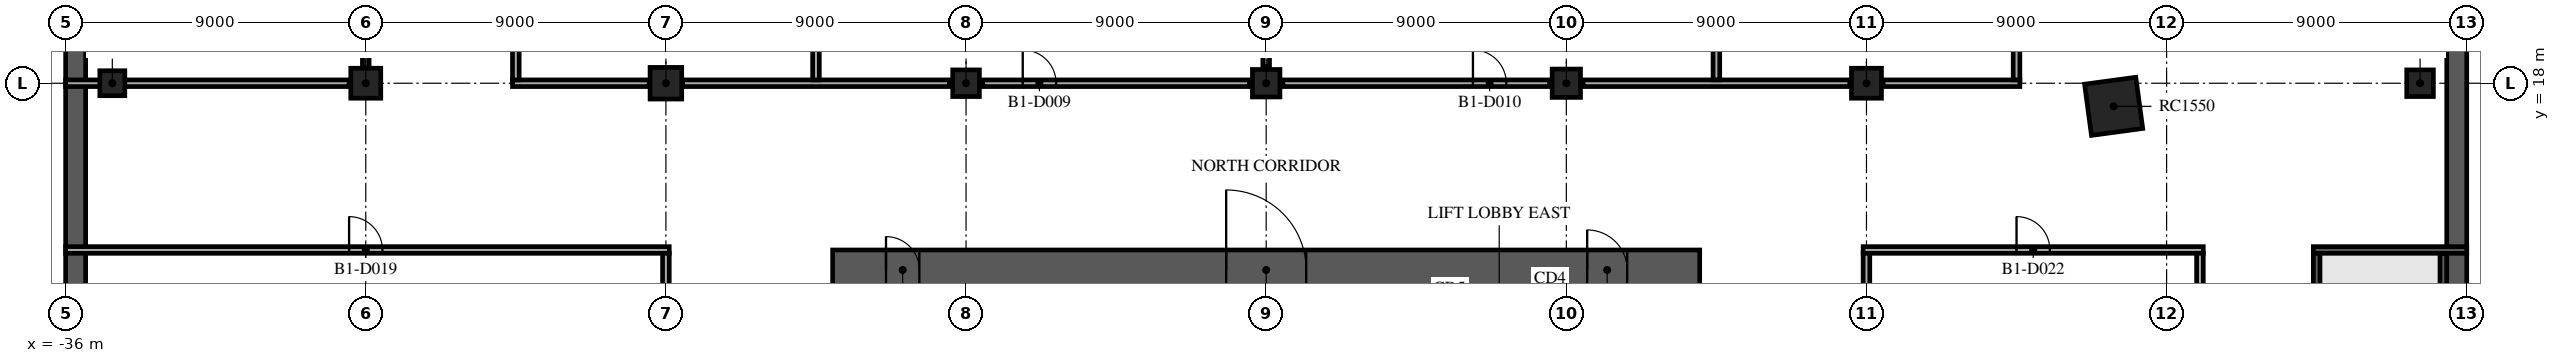
"""IFC4 building model, lengths in metres.
Left out: names, types, materials, properties, quantities, classifications, styles, units other than length and angle.
Written with IfcOpenShell. Run it as: python <this file> out.ifc"""

import sys

from ifc_helpers import new_model, si_unit, direction, frame, frame_2d, origin, origin_2d, place, context, subcontext, project, spatial, rectangle, extrude, element, fill, save


model = new_model("IFC4")
c1 = context("Model", 3, precision=1e-05, world=origin(), true_north=direction((0.0, 1.0)))
c2 = subcontext(c1, "Body", "Model", "MODEL_VIEW")
j1 = project(units=[si_unit("LENGTHUNIT", "METRE"), si_unit("PLANEANGLEUNIT", "RADIAN")], contexts=[c1])
p1 = place(None, origin())
s1 = spatial("IfcSite", under=j1, at=p1, CompositionType="ELEMENT")
p2 = place(p1, origin())
s2 = spatial("IfcBuilding", under=s1, at=p2, CompositionType="ELEMENT")
p3 = place(p2, frame((0.0, 0.0, -4.5)))
s3 = spatial("IfcBuildingStorey", under=s2, at=p3, CompositionType="ELEMENT", Elevation=-4.5)
for number, where, z_axis, x_axis in (
    (1, (35.7, -31.0, -0.3), (0.0, 0.0, 1.0), (0.0, 1.0, 0.0)),
    (2, (-35.7, 31.0, -0.3), (0.0, 0.0, 1.0), (0.0, -1.0, 0.0)),
):
    element("IfcWall", number, at=place(p3, frame(where, z_axis=z_axis, x_axis=x_axis)), inside=s3, PredefinedType="SOLIDWALL", context=c2, shape_type="SweptSolid", body=[
        extrude(rectangle(XDim=62.0, YDim=0.6, at=frame_2d((31.0, 0.0))), origin(), (0.0, 0.0, 1.0), 4.4),
    ])
p4 = place(p3, frame((-34.6, 18.0, 0.0), z_axis=(0.0, 0.0, 1.0), x_axis=(1.0, 0.0, 0.0)))
e3 = element("IfcColumn", 3, at=p4, inside=s3, PredefinedType="COLUMN", context=c2, shape_type="SweptSolid", body=[
    extrude(rectangle(XDim=0.75, YDim=0.75, at=origin_2d()), origin(), (0.0, 0.0, 1.0), 4.5),
])
p5 = place(p3, frame((-27.0, 18.0, 0.0), z_axis=(0.0, 0.0, 1.0), x_axis=(1.0, 0.0, 0.0)))
e4 = element("IfcColumn", 4, at=p5, inside=s3, PredefinedType="COLUMN", context=c2, shape_type="SweptSolid", body=[
    extrude(rectangle(XDim=0.9, YDim=0.9, at=origin_2d()), origin(), (0.0, 0.0, 1.0), 4.5),
])
p6 = place(p3, frame((-18.0, 18.0, 0.0), z_axis=(0.0, 0.0, 1.0), x_axis=(1.0, 0.0, 0.0)))
e5 = element("IfcColumn", 5, at=p6, inside=s3, PredefinedType="COLUMN", context=c2, shape_type="SweptSolid", body=[
    extrude(rectangle(XDim=0.95, YDim=0.95, at=origin_2d()), origin(), (0.0, 0.0, 1.0), 4.5),
])
p7 = place(p3, frame((-9.0, 18.0, 0.0), z_axis=(0.0, 0.0, 1.0), x_axis=(1.0, 0.0, 0.0)))
e6 = element("IfcColumn", 6, at=p7, inside=s3, PredefinedType="COLUMN", context=c2, shape_type="SweptSolid", body=[
    extrude(rectangle(XDim=0.8, YDim=0.8, at=origin_2d()), origin(), (0.0, 0.0, 1.0), 4.5),
])
p8 = place(p3, frame((0.0, 18.0, 0.0), z_axis=(0.0, 0.0, 1.0), x_axis=(1.0, 0.0, 0.0)))
e7 = element("IfcColumn", 7, at=p8, inside=s3, PredefinedType="COLUMN", context=c2, shape_type="SweptSolid", body=[
    extrude(rectangle(XDim=0.825, YDim=0.825, at=origin_2d()), origin(), (0.0, 0.0, 1.0), 4.5),
])
p9 = place(p3, frame((9.0, 18.0, 0.0), z_axis=(0.0, 0.0, 1.0), x_axis=(1.0, 0.0, 0.0)))
e8 = element("IfcColumn", 8, at=p9, inside=s3, PredefinedType="COLUMN", context=c2, shape_type="SweptSolid", body=[
    extrude(rectangle(XDim=0.85, YDim=0.85, at=origin_2d()), origin(), (0.0, 0.0, 1.0), 4.5),
])
p10 = place(p3, frame((18.0, 18.0, 0.0), z_axis=(0.0, 0.0, 1.0), x_axis=(1.0, 0.0, 0.0)))
e9 = element("IfcColumn", 9, at=p10, inside=s3, PredefinedType="COLUMN", context=c2, shape_type="SweptSolid", body=[
    extrude(rectangle(XDim=0.9, YDim=0.9, at=origin_2d()), origin(), (0.0, 0.0, 1.0), 4.5),
])
p11 = place(p3, frame((34.6, 18.0, 0.0), z_axis=(0.0, 0.0, 1.0), x_axis=(1.0, 0.0, 0.0)))
e10 = element("IfcColumn", 10, at=p11, inside=s3, PredefinedType="COLUMN", context=c2, shape_type="SweptSolid", body=[
    extrude(rectangle(XDim=0.8, YDim=0.8, at=origin_2d()), origin(), (0.0, 0.0, 1.0), 4.5),
])
p12 = place(p3, frame((25.412, 17.307, 0.0), z_axis=(0.0, 0.0, 1.0), x_axis=(0.991001197216, 0.133853005627, 0.0)))
e11 = element("IfcColumn", 11, at=p12, inside=s3, PredefinedType="COLUMN", context=c2, shape_type="SweptSolid", body=[
    extrude(rectangle(XDim=1.55, YDim=1.55, at=origin_2d()), origin(), (0.0, 0.0, 1.0), 4.5),
])
p13 = place(p3, frame((-13.0, 12.4, 0.0), z_axis=(0.0, 0.0, 1.0), x_axis=(1.0, 0.0, 0.0)))
e12 = element("IfcWall", 12, at=p13, inside=s3, PredefinedType="SHEAR", context=c2, shape_type="SweptSolid", body=[
    extrude(rectangle(XDim=26.0, YDim=1.2, at=frame_2d((13.0, 0.0))), origin(), (0.0, 0.0, 1.0), 4.1),
])
p14 = place(p13, frame((11.8, 0.0, 0.0)))
e13 = element("IfcOpeningElement", 13, at=p14, cuts=e12, PredefinedType="OPENING", context=c2, shape_type="SweptSolid", body=[
    extrude(rectangle(XDim=2.4, YDim=2.4, at=frame_2d((1.2, 1.2))), frame((0.0, 0.61, 0.0), z_axis=(0.0, -1.0, 0.0), x_axis=(1.0, 0.0, 0.0)), (0.0, 0.0, 1.0), 1.22),
])
p15 = place(p13, frame((22.625, 0.0, 0.0)))
e14 = element("IfcOpeningElement", 14, at=p15, cuts=e12, PredefinedType="OPENING", context=c2, shape_type="SweptSolid", body=[
    extrude(rectangle(XDim=1.2, YDim=2.1, at=frame_2d((0.6, 1.05))), frame((0.0, 0.61, 0.0), z_axis=(0.0, -1.0, 0.0), x_axis=(1.0, 0.0, 0.0)), (0.0, 0.0, 1.0), 1.22),
])
p16 = place(p13, frame((1.6, 0.0, 0.0)))
e15 = element("IfcOpeningElement", 15, at=p16, cuts=e12, PredefinedType="OPENING", context=c2, shape_type="SweptSolid", body=[
    extrude(rectangle(XDim=1.0, YDim=2.1, at=frame_2d((0.5, 1.05))), frame((0.0, 0.61, 0.0), z_axis=(0.0, -1.0, 0.0), x_axis=(1.0, 0.0, 0.0)), (0.0, 0.0, 1.0), 1.22),
])
p17 = place(p3, frame((-36.0, 13.0, 0.0), z_axis=(0.0, 0.0, 1.0), x_axis=(1.0, 0.0, 0.0)))
e16 = element("IfcWall", 16, at=p17, inside=s3, PredefinedType="PARTITIONING", context=c2, shape_type="SweptSolid", body=[
    extrude(rectangle(XDim=18.1, YDim=0.2, at=frame_2d((9.05, 0.0))), origin(), (0.0, 0.0, 1.0), 4.1),
])
p18 = place(p17, frame((8.5, 0.0, 0.0)))
e17 = element("IfcOpeningElement", 17, at=p18, cuts=e16, PredefinedType="OPENING", context=c2, shape_type="SweptSolid", body=[
    extrude(rectangle(XDim=1.0, YDim=2.1, at=frame_2d((0.5, 1.05))), frame((0.0, 0.11, 0.0), z_axis=(0.0, -1.0, 0.0), x_axis=(1.0, 0.0, 0.0)), (0.0, 0.0, 1.0), 0.22),
])
p19 = place(p3, frame((17.9, 13.0, 0.0), z_axis=(0.0, 0.0, 1.0), x_axis=(1.0, 0.0, 0.0)))
e18 = element("IfcWall", 18, at=p19, inside=s3, PredefinedType="PARTITIONING", context=c2, shape_type="SweptSolid", body=[
    extrude(rectangle(XDim=10.2, YDim=0.2, at=frame_2d((5.1, 0.0))), origin(), (0.0, 0.0, 1.0), 4.1),
])
p20 = place(p19, frame((4.6, 0.0, 0.0)))
e19 = element("IfcOpeningElement", 19, at=p20, cuts=e18, PredefinedType="OPENING", context=c2, shape_type="SweptSolid", body=[
    extrude(rectangle(XDim=1.0, YDim=2.1, at=frame_2d((0.5, 1.05))), frame((0.0, 0.11, 0.0), z_axis=(0.0, -1.0, 0.0), x_axis=(1.0, 0.0, 0.0)), (0.0, 0.0, 1.0), 0.22),
])
p21 = place(p3, frame((31.4, 13.0, 0.0), z_axis=(0.0, 0.0, 1.0), x_axis=(1.0, 0.0, 0.0)))
e20 = element("IfcWall", 20, at=p21, inside=s3, PredefinedType="PARTITIONING", context=c2, shape_type="SweptSolid", body=[
    extrude(rectangle(XDim=4.6, YDim=0.2, at=frame_2d((2.3, 0.0))), origin(), (0.0, 0.0, 1.0), 4.1),
])
p22 = place(p3, frame((-36.0, 18.0, 0.0), z_axis=(0.0, 0.0, 1.0), x_axis=(1.0, 0.0, 0.0)))
e21 = element("IfcWall", 21, at=p22, inside=s3, PredefinedType="PARTITIONING", context=c2, shape_type="SweptSolid", body=[
    extrude(rectangle(XDim=8.5, YDim=0.2, at=frame_2d((4.25, 0.0))), origin(), (0.0, 0.0, 1.0), 4.1),
])
p23 = place(p3, frame((-22.6, 18.0, 0.0), z_axis=(0.0, 0.0, 1.0), x_axis=(1.0, 0.0, 0.0)))
e22 = element("IfcWall", 22, at=p23, inside=s3, PredefinedType="PARTITIONING", context=c2, shape_type="SweptSolid", body=[
    extrude(rectangle(XDim=4.1, YDim=0.2, at=frame_2d((2.05, 0.0))), origin(), (0.0, 0.0, 1.0), 4.1),
])
p24 = place(p3, frame((-17.5, 18.0, 0.0), z_axis=(0.0, 0.0, 1.0), x_axis=(1.0, 0.0, 0.0)))
e23 = element("IfcWall", 23, at=p24, inside=s3, PredefinedType="PARTITIONING", context=c2, shape_type="SweptSolid", body=[
    extrude(rectangle(XDim=8.0, YDim=0.2, at=frame_2d((4.0, 0.0))), origin(), (0.0, 0.0, 1.0), 4.1),
])
p25 = place(p3, frame((-8.5, 18.0, 0.0), z_axis=(0.0, 0.0, 1.0), x_axis=(1.0, 0.0, 0.0)))
e24 = element("IfcWall", 24, at=p25, inside=s3, PredefinedType="PARTITIONING", context=c2, shape_type="SweptSolid", body=[
    extrude(rectangle(XDim=8.0, YDim=0.2, at=frame_2d((4.0, 0.0))), origin(), (0.0, 0.0, 1.0), 4.1),
])
p26 = place(p25, frame((1.2, 0.0, 0.0)))
e25 = element("IfcOpeningElement", 25, at=p26, cuts=e24, PredefinedType="OPENING", context=c2, shape_type="SweptSolid", body=[
    extrude(rectangle(XDim=1.0, YDim=2.1, at=frame_2d((0.5, 1.05))), frame((0.0, 0.11, 0.0), z_axis=(0.0, -1.0, 0.0), x_axis=(1.0, 0.0, 0.0)), (0.0, 0.0, 1.0), 0.22),
])
p27 = place(p3, frame((0.5, 18.0, 0.0), z_axis=(0.0, 0.0, 1.0), x_axis=(1.0, 0.0, 0.0)))
e26 = element("IfcWall", 26, at=p27, inside=s3, PredefinedType="PARTITIONING", context=c2, shape_type="SweptSolid", body=[
    extrude(rectangle(XDim=8.0, YDim=0.2, at=frame_2d((4.0, 0.0))), origin(), (0.0, 0.0, 1.0), 4.1),
])
p28 = place(p27, frame((5.7, 0.0, 0.0)))
e27 = element("IfcOpeningElement", 27, at=p28, cuts=e26, PredefinedType="OPENING", context=c2, shape_type="SweptSolid", body=[
    extrude(rectangle(XDim=1.0, YDim=2.1, at=frame_2d((0.5, 1.05))), frame((0.0, 0.11, 0.0), z_axis=(0.0, -1.0, 0.0), x_axis=(1.0, 0.0, 0.0)), (0.0, 0.0, 1.0), 0.22),
])
p29 = place(p3, frame((9.5, 18.0, 0.0), z_axis=(0.0, 0.0, 1.0), x_axis=(1.0, 0.0, 0.0)))
e28 = element("IfcWall", 28, at=p29, inside=s3, PredefinedType="PARTITIONING", context=c2, shape_type="SweptSolid", body=[
    extrude(rectangle(XDim=8.0, YDim=0.2, at=frame_2d((4.0, 0.0))), origin(), (0.0, 0.0, 1.0), 4.1),
])
p30 = place(p3, frame((18.5, 18.0, 0.0), z_axis=(0.0, 0.0, 1.0), x_axis=(1.0, 0.0, 0.0)))
e29 = element("IfcWall", 29, at=p30, inside=s3, PredefinedType="PARTITIONING", context=c2, shape_type="SweptSolid", body=[
    extrude(rectangle(XDim=4.1, YDim=0.2, at=frame_2d((2.05, 0.0))), origin(), (0.0, 0.0, 1.0), 4.1),
])
p31 = place(p3, frame((-27.0, 18.45, 0.0), z_axis=(0.0, 0.0, 1.0), x_axis=(0.0, 1.0, 0.0)))
e30 = element("IfcWall", 30, at=p31, inside=s3, PredefinedType="PARTITIONING", context=c2, shape_type="SweptSolid", body=[
    extrude(rectangle(XDim=1.354, YDim=0.2, at=frame_2d((0.677, 0.0))), origin(), (0.0, 0.0, 1.0), 4.1),
])
p32 = place(p3, frame((-22.5, 18.1, 0.0), z_axis=(0.0, 0.0, 1.0), x_axis=(0.0, 1.0, 0.0)))
e31 = element("IfcWall", 31, at=p32, inside=s3, PredefinedType="PARTITIONING", context=c2, shape_type="SweptSolid", body=[
    extrude(rectangle(XDim=13.3, YDim=0.2, at=frame_2d((6.65, 0.0))), origin(), (0.0, 0.0, 1.0), 4.1),
])
p33 = place(p32, frame((6.1, 0.0, 0.0)))
e32 = element("IfcOpeningElement", 32, at=p33, cuts=e31, PredefinedType="OPENING", context=c2, shape_type="SweptSolid", body=[
    extrude(rectangle(XDim=1.0, YDim=2.1, at=frame_2d((0.5, 1.05))), frame((0.0, 0.11, 0.0), z_axis=(0.0, -1.0, 0.0), x_axis=(1.0, 0.0, 0.0)), (0.0, 0.0, 1.0), 0.22),
])
p34 = place(p3, frame((-18.0, 9.5, 0.0), z_axis=(0.0, 0.0, 1.0), x_axis=(0.0, 1.0, 0.0)))
e33 = element("IfcWall", 33, at=p34, inside=s3, PredefinedType="PARTITIONING", context=c2, shape_type="SweptSolid", body=[
    extrude(rectangle(XDim=3.4, YDim=0.2, at=frame_2d((1.7, 0.0))), origin(), (0.0, 0.0, 1.0), 4.1),
])
p35 = place(p3, frame((-13.5, 18.1, 0.0), z_axis=(0.0, 0.0, 1.0), x_axis=(0.0, 1.0, 0.0)))
e34 = element("IfcWall", 34, at=p35, inside=s3, PredefinedType="PARTITIONING", context=c2, shape_type="SweptSolid", body=[
    extrude(rectangle(XDim=17.9, YDim=0.2, at=frame_2d((8.95, 0.0))), origin(), (0.0, 0.0, 1.0), 4.1),
])
p36 = place(p3, frame((0.0, 18.5, 0.0), z_axis=(0.0, 0.0, 1.0), x_axis=(0.0, 1.0, 0.0)))
e35 = element("IfcWall", 35, at=p36, inside=s3, PredefinedType="PARTITIONING", context=c2, shape_type="SweptSolid", body=[
    extrude(rectangle(XDim=8.0, YDim=0.2, at=frame_2d((4.0, 0.0))), origin(), (0.0, 0.0, 1.0), 4.1),
])
p37 = place(p3, frame((13.5, 18.1, 0.0), z_axis=(0.0, 0.0, 1.0), x_axis=(0.0, 1.0, 0.0)))
e36 = element("IfcWall", 36, at=p37, inside=s3, PredefinedType="PARTITIONING", context=c2, shape_type="SweptSolid", body=[
    extrude(rectangle(XDim=17.9, YDim=0.2, at=frame_2d((8.95, 0.0))), origin(), (0.0, 0.0, 1.0), 4.1),
])
p38 = place(p3, frame((18.0, 9.5, 0.0), z_axis=(0.0, 0.0, 1.0), x_axis=(0.0, 1.0, 0.0)))
e37 = element("IfcWall", 37, at=p38, inside=s3, PredefinedType="PARTITIONING", context=c2, shape_type="SweptSolid", body=[
    extrude(rectangle(XDim=3.4, YDim=0.2, at=frame_2d((1.7, 0.0))), origin(), (0.0, 0.0, 1.0), 4.1),
])
p39 = place(p3, frame((22.5, 18.1, 0.0), z_axis=(0.0, 0.0, 1.0), x_axis=(0.0, 1.0, 0.0)))
e38 = element("IfcWall", 38, at=p39, inside=s3, PredefinedType="PARTITIONING", context=c2, shape_type="SweptSolid", body=[
    extrude(rectangle(XDim=13.3, YDim=0.2, at=frame_2d((6.65, 0.0))), origin(), (0.0, 0.0, 1.0), 4.1),
])
p40 = place(p39, frame((6.1, 0.0, 0.0)))
e39 = element("IfcOpeningElement", 39, at=p40, cuts=e38, PredefinedType="OPENING", context=c2, shape_type="SweptSolid", body=[
    extrude(rectangle(XDim=1.0, YDim=2.1, at=frame_2d((0.5, 1.05))), frame((0.0, 0.11, 0.0), z_axis=(0.0, -1.0, 0.0), x_axis=(1.0, 0.0, 0.0)), (0.0, 0.0, 1.0), 0.22),
])
p41 = place(p3, frame((28.0, 4.1, 0.0), z_axis=(0.0, 0.0, 1.0), x_axis=(0.0, 1.0, 0.0)))
e40 = element("IfcWall", 40, at=p41, inside=s3, PredefinedType="PARTITIONING", context=c2, shape_type="SweptSolid", body=[
    extrude(rectangle(XDim=8.8, YDim=0.2, at=frame_2d((4.4, 0.0))), origin(), (0.0, 0.0, 1.0), 4.1),
])
p42 = place(p3, frame((31.5, 4.1, 0.0), z_axis=(0.0, 0.0, 1.0), x_axis=(0.0, 1.0, 0.0)))
e41 = element("IfcWall", 41, at=p42, inside=s3, PredefinedType="PARTITIONING", context=c2, shape_type="SweptSolid", body=[
    extrude(rectangle(XDim=8.8, YDim=0.2, at=frame_2d((4.4, 0.0))), origin(), (0.0, 0.0, 1.0), 4.1),
])
p43 = place(p42, frame((0.7, 0.0, 0.0)))
e42 = element("IfcOpeningElement", 42, at=p43, cuts=e41, PredefinedType="OPENING", context=c2, shape_type="SweptSolid", body=[
    extrude(rectangle(XDim=1.2, YDim=2.1, at=frame_2d((0.6, 1.05))), frame((0.0, 0.11, 0.0), z_axis=(0.0, -1.0, 0.0), x_axis=(1.0, 0.0, 0.0)), (0.0, 0.0, 1.0), 0.22),
])
p44 = place(p3, frame((35.298, 9.581, 0.0), z_axis=(0.0, 0.0, 1.0), x_axis=(0.0, 1.0, 0.0)))
e43 = element("IfcWall", 43, at=p44, inside=s3, PredefinedType="PARTITIONING", context=c2, shape_type="SweptSolid", body=[
    extrude(rectangle(XDim=3.309, YDim=0.2, at=frame_2d((1.655, 0.0))), origin(), (0.0, 0.0, 1.0), 4.1),
])
p45 = place(p14, origin())
e44 = element("IfcDoor", 44, at=p45, inside=s3, OperationType="SINGLE_SWING_LEFT", PredefinedType="DOOR", context=c2, shape_type="SweptSolid", body=[
    extrude(rectangle(XDim=2.4, YDim=2.4, at=frame_2d((1.2, 1.2))), frame((0.0, 0.025, 0.0), z_axis=(0.0, -1.0, 0.0), x_axis=(1.0, 0.0, 0.0)), (0.0, 0.0, 1.0), 0.05),
])
fill(e13, e44)
p46 = place(p15, origin())
e45 = element("IfcDoor", 45, at=p46, inside=s3, OperationType="SINGLE_SWING_LEFT", PredefinedType="DOOR", context=c2, shape_type="SweptSolid", body=[
    extrude(rectangle(XDim=1.2, YDim=2.1, at=frame_2d((0.6, 1.05))), frame((0.0, 0.025, 0.0), z_axis=(0.0, -1.0, 0.0), x_axis=(1.0, 0.0, 0.0)), (0.0, 0.0, 1.0), 0.05),
])
fill(e14, e45)
p47 = place(p16, origin())
e46 = element("IfcDoor", 46, at=p47, inside=s3, OperationType="SINGLE_SWING_LEFT", PredefinedType="DOOR", context=c2, shape_type="SweptSolid", body=[
    extrude(rectangle(XDim=1.0, YDim=2.1, at=frame_2d((0.5, 1.05))), frame((0.0, 0.025, 0.0), z_axis=(0.0, -1.0, 0.0), x_axis=(1.0, 0.0, 0.0)), (0.0, 0.0, 1.0), 0.05),
])
fill(e15, e46)
p48 = place(p26, origin())
e47 = element("IfcDoor", 47, at=p48, inside=s3, OperationType="SINGLE_SWING_LEFT", PredefinedType="DOOR", context=c2, shape_type="SweptSolid", body=[
    extrude(rectangle(XDim=1.0, YDim=2.1, at=frame_2d((0.5, 1.05))), frame((0.0, 0.025, 0.0), z_axis=(0.0, -1.0, 0.0), x_axis=(1.0, 0.0, 0.0)), (0.0, 0.0, 1.0), 0.05),
])
fill(e25, e47)
p49 = place(p28, origin())
e48 = element("IfcDoor", 48, at=p49, inside=s3, OperationType="SINGLE_SWING_RIGHT", PredefinedType="DOOR", context=c2, shape_type="SweptSolid", body=[
    extrude(rectangle(XDim=1.0, YDim=2.1, at=frame_2d((0.5, 1.05))), frame((0.0, 0.025, 0.0), z_axis=(0.0, -1.0, 0.0), x_axis=(1.0, 0.0, 0.0)), (0.0, 0.0, 1.0), 0.05),
])
fill(e27, e48)
p50 = place(p18, origin())
e49 = element("IfcDoor", 49, at=p50, inside=s3, OperationType="SINGLE_SWING_LEFT", PredefinedType="DOOR", context=c2, shape_type="SweptSolid", body=[
    extrude(rectangle(XDim=1.0, YDim=2.1, at=frame_2d((0.5, 1.05))), frame((0.0, 0.025, 0.0), z_axis=(0.0, -1.0, 0.0), x_axis=(1.0, 0.0, 0.0)), (0.0, 0.0, 1.0), 0.05),
])
fill(e17, e49)
p51 = place(p20, origin())
e50 = element("IfcDoor", 50, at=p51, inside=s3, OperationType="SINGLE_SWING_RIGHT", PredefinedType="DOOR", context=c2, shape_type="SweptSolid", body=[
    extrude(rectangle(XDim=1.0, YDim=2.1, at=frame_2d((0.5, 1.05))), frame((0.0, 0.025, 0.0), z_axis=(0.0, -1.0, 0.0), x_axis=(1.0, 0.0, 0.0)), (0.0, 0.0, 1.0), 0.05),
])
fill(e19, e50)
save(model, sys.argv[1])
